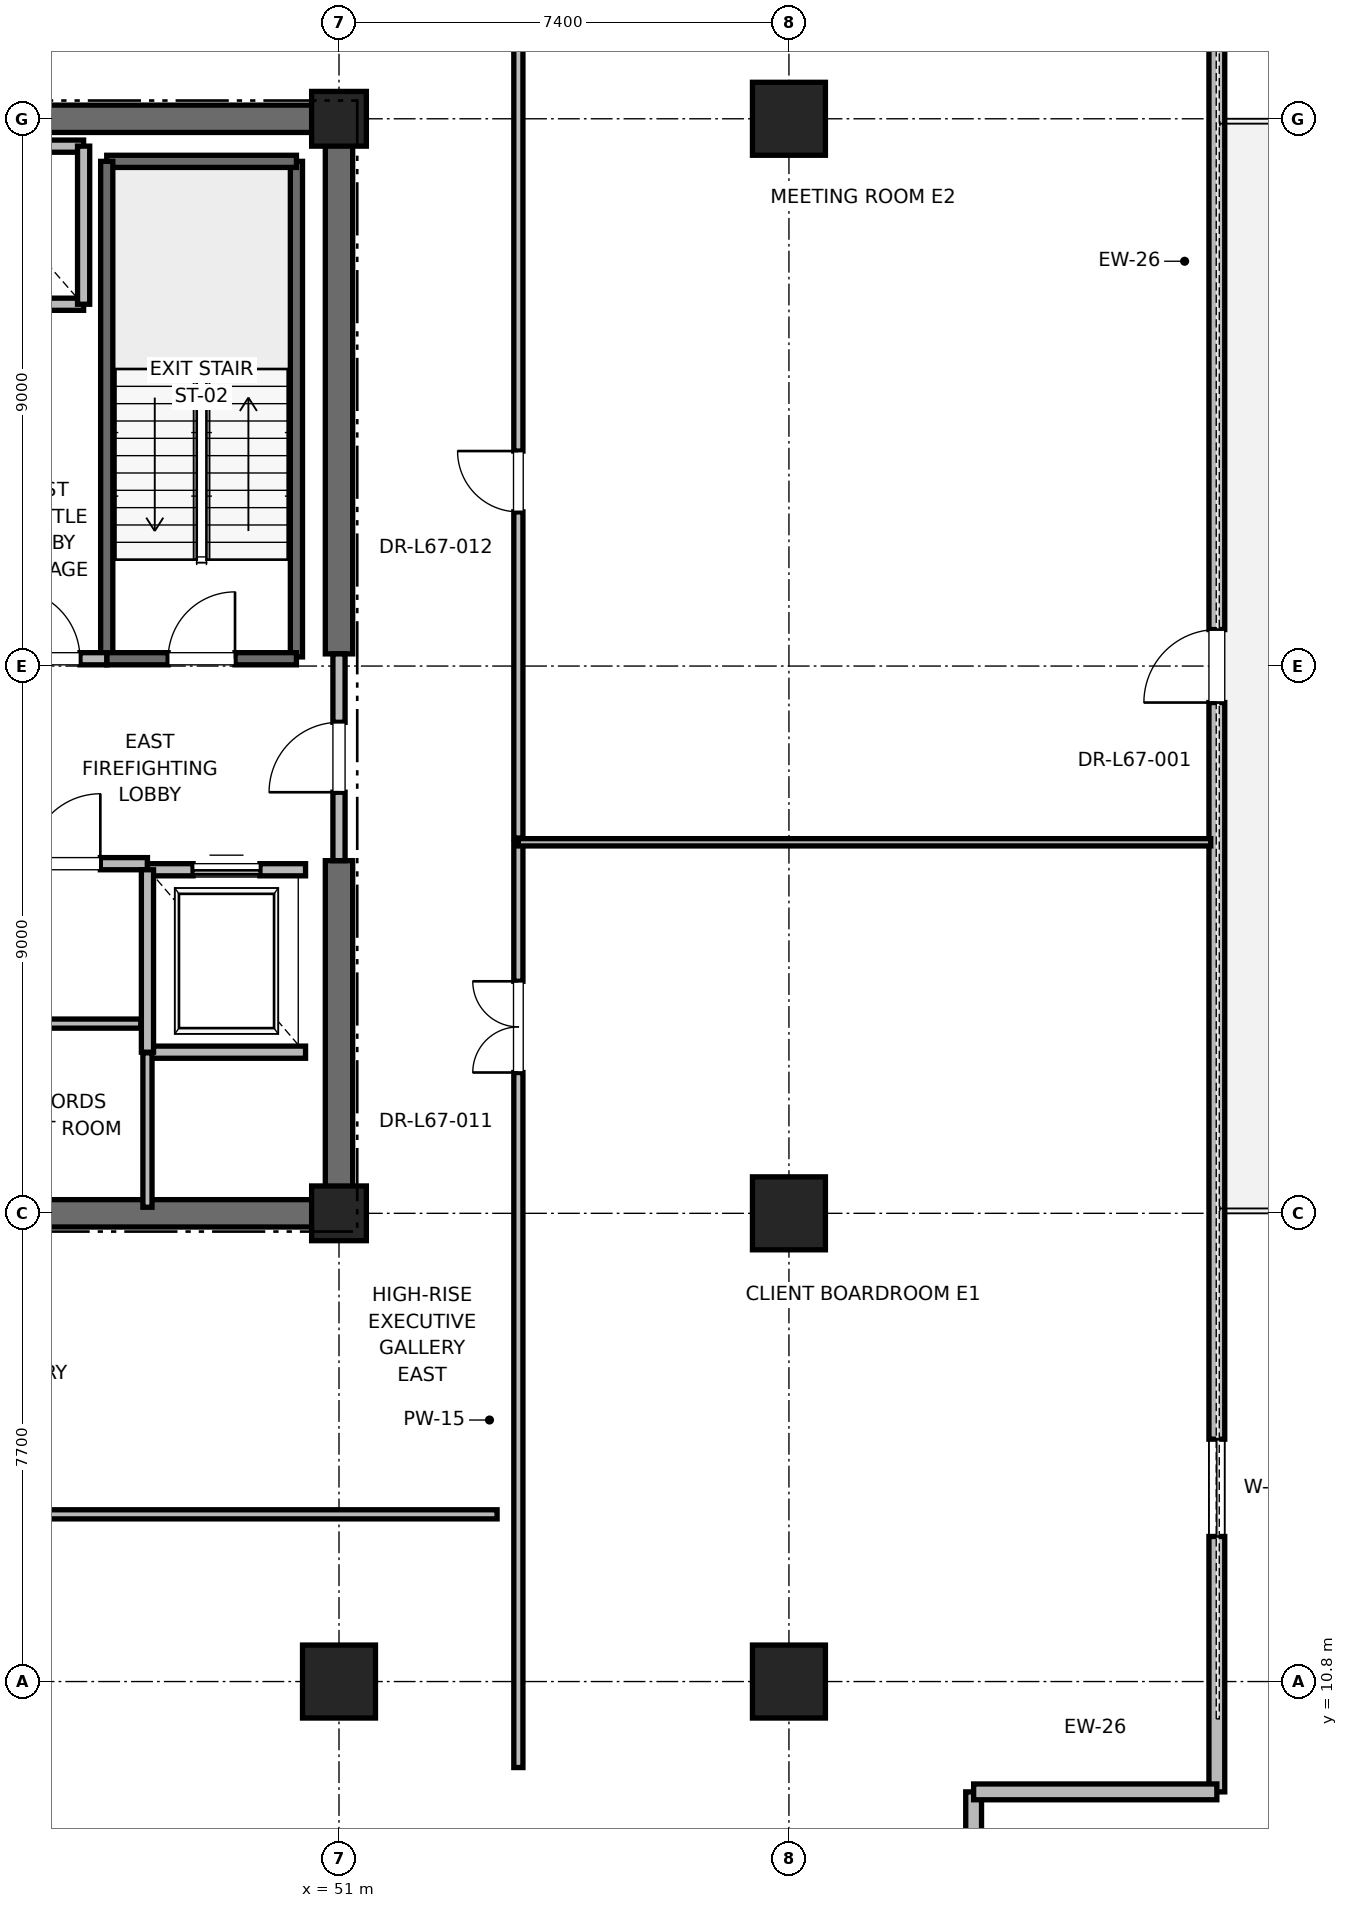
"""IFC4 building model, lengths in metres.
Left out: names, types, materials, properties, quantities, classifications, styles, units other than length and angle.
Written with IfcOpenShell. Run it as: python <this file> out.ifc"""

import sys

from ifc_helpers import new_model, si_unit, direction, frame, frame_2d, origin, origin_2d, place, context, subcontext, project, spatial, rectangle, extrude, element, fill, save


model = new_model("IFC4")
c1 = context("Model", 3, precision=1e-05, world=origin(), true_north=direction((0.0, 1.0)))
c2 = subcontext(c1, "Body", "Model", "MODEL_VIEW")
j1 = project(units=[si_unit("LENGTHUNIT", "METRE"), si_unit("PLANEANGLEUNIT", "RADIAN")], contexts=[c1])
p1 = place(None, origin())
s1 = spatial("IfcSite", under=j1, at=p1, CompositionType="ELEMENT")
p2 = place(p1, origin())
s2 = spatial("IfcBuilding", under=s1, at=p2, CompositionType="ELEMENT")
p3 = place(p2, frame((0.0, 0.0, 287.2)))
s3 = spatial("IfcBuildingStorey", under=s2, at=p3, CompositionType="ELEMENT", Elevation=287.2)
for number, where, z_axis, x_axis in (
    (1, (51.0, 10.8, 0.0), (0.0, 0.0, 1.0), (1.0, 0.0, 0.0)),
    (2, (58.4, 18.5, 0.0), (0.0, 0.0, 1.0), (1.0, 0.0, 0.0)),
    (3, (58.4, 36.5, 0.0), (0.0, 0.0, 1.0), (1.0, 0.0, 0.0)),
    (4, (58.4, 10.8, 0.0), (0.0, 0.0, 1.0), (1.0, 0.0, 0.0)),
):
    element("IfcColumn", number, at=place(p3, frame(where, z_axis=z_axis, x_axis=x_axis)), inside=s3, PredefinedType="COLUMN", context=c2, shape_type="SweptSolid", body=[
        extrude(rectangle(XDim=1.2, YDim=1.2, at=origin_2d()), origin(), (0.0, 0.0, 1.0), 4.0),
    ])
for number, where, z_axis, x_axis in (
    (5, (51.0, 18.5, 0.0), (0.0, 0.0, 1.0), (1.0, 0.0, 0.0)),
    (6, (51.0, 36.5, 0.0), (0.0, 0.0, 1.0), (1.0, 0.0, 0.0)),
):
    element("IfcColumn", number, at=place(p3, frame(where, z_axis=z_axis, x_axis=x_axis)), inside=s3, PredefinedType="PILASTER", context=c2, shape_type="SweptSolid", body=[
        extrude(rectangle(XDim=0.9, YDim=0.9, at=origin_2d()), origin(), (0.0, 0.0, 1.0), 4.0),
    ])
p4 = place(p3, frame((41.8, 18.5, 0.0), z_axis=(0.0, 0.0, 1.0), x_axis=(1.0, 0.0, 0.0)))
e7 = element("IfcWall", 7, at=p4, inside=s3, PredefinedType="SHEAR", context=c2, shape_type="SweptSolid", body=[
    extrude(rectangle(XDim=9.2, YDim=0.45, at=frame_2d((4.6, 0.0))), origin(), (0.0, 0.0, 1.0), 3.785),
])
for number, where, z_axis, x_axis in (
    (8, (45.2, 36.5, 0.0), (0.0, 0.0, 1.0), (1.0, 0.0, 0.0)),
    (9, (51.0, 18.5, 0.0), (0.0, 0.0, 1.0), (0.0, 1.0, 0.0)),
):
    element("IfcWall", number, at=place(p3, frame(where, z_axis=z_axis, x_axis=x_axis)), inside=s3, PredefinedType="SHEAR", context=c2, shape_type="SweptSolid", body=[
        extrude(rectangle(XDim=5.8, YDim=0.45, at=frame_2d((2.9, 0.0))), origin(), (0.0, 0.0, 1.0), 3.785),
    ])
p5 = place(p3, frame((51.0, 27.7, 0.0), z_axis=(0.0, 0.0, 1.0), x_axis=(0.0, 1.0, 0.0)))
e10 = element("IfcWall", 10, at=p5, inside=s3, PredefinedType="SHEAR", context=c2, shape_type="SweptSolid", body=[
    extrude(rectangle(XDim=8.8, YDim=0.45, at=frame_2d((4.4, 0.0))), origin(), (0.0, 0.0, 1.0), 3.785),
])
p6 = place(p3, frame((65.438, 8.986, 0.0), z_axis=(0.0, 0.0, 1.0), x_axis=(0.0, 1.0, 0.0)))
e11 = element("IfcWall", 11, at=p6, inside=s3, PredefinedType="PARAPET", context=c2, shape_type="SweptSolid", body=[
    extrude(rectangle(XDim=37.029, YDim=0.26, at=frame_2d((18.514, 0.0))), origin(), (0.0, 0.0, 1.0), 3.123),
])
p7 = place(p6, frame((4.2, 0.0, 0.85)))
e12 = element("IfcOpeningElement", 12, at=p7, cuts=e11, PredefinedType="OPENING", context=c2, shape_type="SweptSolid", body=[
    extrude(rectangle(XDim=1.6, YDim=2.1, at=frame_2d((0.8, 1.05))), frame((0.0, 0.13, 0.0), z_axis=(0.0, -1.0, 0.0), x_axis=(1.0, 0.0, 0.0)), (0.0, 0.0, 1.0), 0.26),
])
p8 = place(p6, frame((17.914, 0.0, 0.0)))
e13 = element("IfcOpeningElement", 13, at=p8, cuts=e11, PredefinedType="OPENING", context=c2, shape_type="SweptSolid", body=[
    extrude(rectangle(XDim=1.2, YDim=2.2, at=frame_2d((0.6, 1.1))), frame((0.0, 0.13, 0.0), z_axis=(0.0, -1.0, 0.0), x_axis=(1.0, 0.0, 0.0)), (0.0, 0.0, 1.0), 0.26),
])
p9 = place(p6, frame((31.229, 0.0, 0.85)))
e14 = element("IfcOpeningElement", 14, at=p9, cuts=e11, PredefinedType="OPENING", context=c2, shape_type="SweptSolid", body=[
    extrude(rectangle(XDim=1.6, YDim=2.1, at=frame_2d((0.8, 1.05))), frame((0.0, 0.13, 0.0), z_axis=(0.0, -1.0, 0.0), x_axis=(1.0, 0.0, 0.0)), (0.0, 0.0, 1.0), 0.26),
])
p10 = place(p3, frame((61.438, 5.486, 0.0), z_axis=(0.0, 0.0, 1.0), x_axis=(0.0, 1.0, 0.0)))
e15 = element("IfcWall", 15, at=p10, inside=s3, PredefinedType="PARAPET", context=c2, shape_type="SweptSolid", body=[
    extrude(rectangle(XDim=3.5, YDim=0.26, at=frame_2d((1.75, 0.0))), origin(), (0.0, 0.0, 1.0), 3.785),
])
p11 = place(p10, frame((1.05, 0.0, 0.85)))
e16 = element("IfcOpeningElement", 16, at=p11, cuts=e15, PredefinedType="OPENING", context=c2, shape_type="SweptSolid", body=[
    extrude(rectangle(XDim=1.4, YDim=2.0, at=frame_2d((0.7, 1.0))), frame((0.0, 0.13, 0.0), z_axis=(0.0, -1.0, 0.0), x_axis=(1.0, 0.0, 0.0)), (0.0, 0.0, 1.0), 0.26),
])
p12 = place(p3, frame((61.438, 8.986, 0.0), z_axis=(0.0, 0.0, 1.0), x_axis=(1.0, 0.0, 0.0)))
e17 = element("IfcWall", 17, at=p12, inside=s3, PredefinedType="PARAPET", context=c2, shape_type="SweptSolid", body=[
    extrude(rectangle(XDim=4.0, YDim=0.26, at=frame_2d((2.0, 0.0))), origin(), (0.0, 0.0, 1.0), 3.785),
])
p13 = place(p3, frame((50.3, 27.65, 0.0), z_axis=(0.0, 0.0, 1.0), x_axis=(0.0, 1.0, 0.0)))
e18 = element("IfcWall", 18, at=p13, inside=s3, PredefinedType="SOLIDWALL", context=c2, shape_type="SweptSolid", body=[
    extrude(rectangle(XDim=8.15, YDim=0.2, at=frame_2d((4.075, 0.0))), origin(), (0.0, 0.0, 1.0), 3.785),
])
p14 = place(p3, frame((47.18, 35.8, 0.0), z_axis=(0.0, 0.0, 1.0), x_axis=(1.0, 0.0, 0.0)))
e19 = element("IfcWall", 19, at=p14, inside=s3, PredefinedType="SOLIDWALL", context=c2, shape_type="SweptSolid", body=[
    extrude(rectangle(XDim=3.12, YDim=0.2, at=frame_2d((1.56, 0.0))), origin(), (0.0, 0.0, 1.0), 3.785),
])
p15 = place(p3, frame((47.18, 27.62, 0.0), z_axis=(0.0, 0.0, 1.0), x_axis=(0.0, 1.0, 0.0)))
e20 = element("IfcWall", 20, at=p15, inside=s3, PredefinedType="SOLIDWALL", context=c2, shape_type="SweptSolid", body=[
    extrude(rectangle(XDim=8.18, YDim=0.2, at=frame_2d((4.09, 0.0))), origin(), (0.0, 0.0, 1.0), 3.785),
])
p16 = place(p3, frame((47.18, 27.62, 0.0), z_axis=(0.0, 0.0, 1.0), x_axis=(1.0, 0.0, 0.0)))
e21 = element("IfcWall", 21, at=p16, inside=s3, PredefinedType="SOLIDWALL", context=c2, shape_type="SweptSolid", body=[
    extrude(rectangle(XDim=3.12, YDim=0.2, at=frame_2d((1.56, 0.0))), origin(), (0.0, 0.0, 1.0), 3.785),
])
p17 = place(p16, frame((1.01, 0.0, 0.0)))
e22 = element("IfcOpeningElement", 22, at=p17, cuts=e21, PredefinedType="OPENING", context=c2, shape_type="SweptSolid", body=[
    extrude(rectangle(XDim=1.1, YDim=2.15, at=frame_2d((0.55, 1.075))), frame((0.0, 0.1, 0.0), z_axis=(0.0, -1.0, 0.0), x_axis=(1.0, 0.0, 0.0)), (0.0, 0.0, 1.0), 0.2),
])
p18 = place(p3, frame((45.15, 24.25, 0.0), z_axis=(0.0, 0.0, 1.0), x_axis=(1.0, 0.0, 0.0)))
e23 = element("IfcWall", 23, at=p18, inside=s3, PredefinedType="PARTITIONING", context=c2, shape_type="SweptSolid", body=[
    extrude(rectangle(XDim=2.7, YDim=0.2, at=frame_2d((1.35, 0.0))), origin(), (0.0, 0.0, 1.0), 3.785),
])
p19 = place(p18, frame((0.775, 0.0, 0.0)))
e24 = element("IfcOpeningElement", 24, at=p19, cuts=e23, PredefinedType="OPENING", context=c2, shape_type="SweptSolid", body=[
    extrude(rectangle(XDim=1.15, YDim=2.2, at=frame_2d((0.575, 1.1))), frame((0.0, 0.1, 0.0), z_axis=(0.0, -1.0, 0.0), x_axis=(1.0, 0.0, 0.0)), (0.0, 0.0, 1.0), 0.2),
])
p20 = place(p3, frame((45.15, 27.62, 0.0), z_axis=(0.0, 0.0, 1.0), x_axis=(1.0, 0.0, 0.0)))
e25 = element("IfcWall", 25, at=p20, inside=s3, PredefinedType="PARTITIONING", context=c2, shape_type="SweptSolid", body=[
    extrude(rectangle(XDim=2.03, YDim=0.2, at=frame_2d((1.015, 0.0))), origin(), (0.0, 0.0, 1.0), 3.785),
])
p21 = place(p20, frame((0.44, 0.0, 0.0)))
e26 = element("IfcOpeningElement", 26, at=p21, cuts=e25, PredefinedType="OPENING", context=c2, shape_type="SweptSolid", body=[
    extrude(rectangle(XDim=1.15, YDim=2.2, at=frame_2d((0.575, 1.1))), frame((0.0, 0.1, 0.0), z_axis=(0.0, -1.0, 0.0), x_axis=(1.0, 0.0, 0.0)), (0.0, 0.0, 1.0), 0.2),
])
p22 = place(p3, frame((51.0, 24.3, 0.0), z_axis=(0.0, 0.0, 1.0), x_axis=(0.0, 1.0, 0.0)))
e27 = element("IfcWall", 27, at=p22, inside=s3, PredefinedType="PARTITIONING", context=c2, shape_type="SweptSolid", body=[
    extrude(rectangle(XDim=3.4, YDim=0.2, at=frame_2d((1.7, 0.0))), origin(), (0.0, 0.0, 1.0), 2.865),
])
p23 = place(p22, frame((1.125, 0.0, 0.0)))
e28 = element("IfcOpeningElement", 28, at=p23, cuts=e27, PredefinedType="OPENING", context=c2, shape_type="SweptSolid", body=[
    extrude(rectangle(XDim=1.15, YDim=2.2, at=frame_2d((0.575, 1.1))), frame((0.0, 0.1, 0.0), z_axis=(0.0, -1.0, 0.0), x_axis=(1.0, 0.0, 0.0)), (0.0, 0.0, 1.0), 0.2),
])
p24 = place(p3, frame((47.85, 21.15, 0.0), z_axis=(0.0, 0.0, 1.0), x_axis=(1.0, 0.0, 0.0)))
e29 = element("IfcWall", 29, at=p24, inside=s3, PredefinedType="SOLIDWALL", context=c2, shape_type="SweptSolid", body=[
    extrude(rectangle(XDim=2.6, YDim=0.2, at=frame_2d((1.3, 0.0))), origin(), (0.0, 0.0, 1.0), 3.785),
])
p25 = place(p3, frame((50.45, 24.15, 0.0), z_axis=(0.0, 0.0, 1.0), x_axis=(-1.0, 0.0, 0.0)))
e30 = element("IfcWall", 30, at=p25, inside=s3, PredefinedType="SOLIDWALL", context=c2, shape_type="SweptSolid", body=[
    extrude(rectangle(XDim=2.6, YDim=0.2, at=frame_2d((1.3, 0.0))), origin(), (0.0, 0.0, 1.0), 2.865),
])
p26 = place(p25, frame((0.75, 0.0, 0.0)))
e31 = element("IfcOpeningElement", 31, at=p26, cuts=e30, PredefinedType="OPENING", context=c2, shape_type="SweptSolid", body=[
    extrude(rectangle(XDim=1.1, YDim=2.2, at=frame_2d((0.55, 1.1))), frame((0.0, 0.1, 0.0), z_axis=(0.0, -1.0, 0.0), x_axis=(1.0, 0.0, 0.0)), (0.0, 0.0, 1.0), 0.2),
])
p27 = place(p3, frame((47.85, 24.15, 0.0), z_axis=(0.0, 0.0, 1.0), x_axis=(0.0, -1.0, 0.0)))
e32 = element("IfcWall", 32, at=p27, inside=s3, PredefinedType="SOLIDWALL", context=c2, shape_type="SweptSolid", body=[
    extrude(rectangle(XDim=3.0, YDim=0.2, at=frame_2d((1.5, 0.0))), origin(), (0.0, 0.0, 1.0), 3.785),
])
p28 = place(p3, frame((44.5, 33.45, 0.0), z_axis=(0.0, 0.0, 1.0), x_axis=(1.0, 0.0, 0.0)))
e33 = element("IfcWall", 33, at=p28, inside=s3, PredefinedType="SOLIDWALL", context=c2, shape_type="SweptSolid", body=[
    extrude(rectangle(XDim=2.3, YDim=0.2, at=frame_2d((1.15, 0.0))), origin(), (0.0, 0.0, 1.0), 3.785),
])
p29 = place(p3, frame((46.8, 36.05, 0.0), z_axis=(0.0, 0.0, 1.0), x_axis=(-1.0, 0.0, 0.0)))
e34 = element("IfcWall", 34, at=p29, inside=s3, PredefinedType="SOLIDWALL", context=c2, shape_type="SweptSolid", body=[
    extrude(rectangle(XDim=2.3, YDim=0.2, at=frame_2d((1.15, 0.0))), origin(), (0.0, 0.0, 1.0), 2.865),
])
p30 = place(p3, frame((46.8, 33.45, 0.0), z_axis=(0.0, 0.0, 1.0), x_axis=(0.0, 1.0, 0.0)))
e35 = element("IfcWall", 35, at=p30, inside=s3, PredefinedType="SOLIDWALL", context=c2, shape_type="SweptSolid", body=[
    extrude(rectangle(XDim=2.6, YDim=0.2, at=frame_2d((1.3, 0.0))), origin(), (0.0, 0.0, 1.0), 3.785),
])
p31 = place(p3, frame((47.85, 18.6, 0.0), z_axis=(0.0, 0.0, 1.0), x_axis=(0.0, 1.0, 0.0)))
e36 = element("IfcWall", 36, at=p31, inside=s3, PredefinedType="PARTITIONING", context=c2, shape_type="SweptSolid", body=[
    extrude(rectangle(XDim=2.54, YDim=0.15, at=frame_2d((1.27, 0.0))), origin(), (0.0, 0.0, 1.0), 2.85),
])
p32 = place(p3, frame((41.76, 21.62, 0.0), z_axis=(0.0, 0.0, 1.0), x_axis=(1.0, 0.0, 0.0)))
e37 = element("IfcWall", 37, at=p32, inside=s3, PredefinedType="PARTITIONING", context=c2, shape_type="SweptSolid", body=[
    extrude(rectangle(XDim=5.98, YDim=0.15, at=frame_2d((2.99, 0.0))), origin(), (0.0, 0.0, 1.0), 2.85),
])
p33 = place(p32, frame((2.49, 0.0, 0.0)))
e38 = element("IfcOpeningElement", 38, at=p33, cuts=e37, PredefinedType="OPENING", context=c2, shape_type="SweptSolid", body=[
    extrude(rectangle(XDim=1.0, YDim=2.15, at=frame_2d((0.5, 1.075))), frame((0.0, 0.075, 0.0), z_axis=(0.0, -1.0, 0.0), x_axis=(1.0, 0.0, 0.0)), (0.0, 0.0, 1.0), 0.15),
])
p34 = place(p3, frame((26.4, 13.55, 0.0), z_axis=(0.0, 0.0, 1.0), x_axis=(1.0, 0.0, 0.0)))
e39 = element("IfcWall", 39, at=p34, inside=s3, PredefinedType="PARTITIONING", context=c2, shape_type="SweptSolid", body=[
    extrude(rectangle(XDim=27.2, YDim=0.15, at=frame_2d((13.6, 0.0))), origin(), (0.0, 0.0, 1.0), 2.85),
])
p35 = place(p34, frame((13.1, 0.0, 0.0)))
e40 = element("IfcOpeningElement", 40, at=p35, cuts=e39, PredefinedType="OPENING", context=c2, shape_type="SweptSolid", body=[
    extrude(rectangle(XDim=1.0, YDim=2.15, at=frame_2d((0.5, 1.075))), frame((0.0, 0.075, 0.0), z_axis=(0.0, -1.0, 0.0), x_axis=(1.0, 0.0, 0.0)), (0.0, 0.0, 1.0), 0.15),
])
p36 = place(p3, frame((53.95, 9.386, 0.0), z_axis=(0.0, 0.0, 1.0), x_axis=(0.0, 1.0, 0.0)))
e41 = element("IfcWall", 41, at=p36, inside=s3, PredefinedType="PARTITIONING", context=c2, shape_type="SweptSolid", body=[
    extrude(rectangle(XDim=15.216, YDim=0.15, at=frame_2d((7.608, 0.0))), origin(), (0.0, 0.0, 1.0), 2.85),
])
p37 = place(p36, frame((11.43, 0.0, 0.0)))
e42 = element("IfcOpeningElement", 42, at=p37, cuts=e41, PredefinedType="OPENING", context=c2, shape_type="SweptSolid", body=[
    extrude(rectangle(XDim=1.5, YDim=2.25, at=frame_2d((0.75, 1.125))), frame((0.0, 0.075, 0.0), z_axis=(0.0, -1.0, 0.0), x_axis=(1.0, 0.0, 0.0)), (0.0, 0.0, 1.0), 0.15),
])
p38 = place(p3, frame((53.95, 24.602, 0.0), z_axis=(0.0, 0.0, 1.0), x_axis=(1.0, 0.0, 0.0)))
e43 = element("IfcWall", 43, at=p38, inside=s3, PredefinedType="PARTITIONING", context=c2, shape_type="SweptSolid", body=[
    extrude(rectangle(XDim=11.387, YDim=0.12, at=frame_2d((5.694, 0.0))), origin(), (0.0, 0.0, 1.0), 2.85),
])
p39 = place(p3, frame((53.95, 24.672, 0.0), z_axis=(0.0, 0.0, 1.0), x_axis=(0.0, 1.0, 0.0)))
e44 = element("IfcWall", 44, at=p39, inside=s3, PredefinedType="PARTITIONING", context=c2, shape_type="SweptSolid", body=[
    extrude(rectangle(XDim=20.943, YDim=0.15, at=frame_2d((10.471, 0.0))), origin(), (0.0, 0.0, 1.0), 2.85),
])
p40 = place(p39, frame((5.364, 0.0, 0.0)))
e45 = element("IfcOpeningElement", 45, at=p40, cuts=e44, PredefinedType="OPENING", context=c2, shape_type="SweptSolid", body=[
    extrude(rectangle(XDim=1.0, YDim=2.15, at=frame_2d((0.5, 1.075))), frame((0.0, 0.075, 0.0), z_axis=(0.0, -1.0, 0.0), x_axis=(1.0, 0.0, 0.0)), (0.0, 0.0, 1.0), 0.15),
])
p41 = place(p7, origin())
e46 = element("IfcWindow", 46, at=p41, inside=s3, PartitioningType="SINGLE_PANEL", PredefinedType="WINDOW", context=c2, shape_type="SweptSolid", body=[
    extrude(rectangle(XDim=1.6, YDim=2.1, at=frame_2d((0.8, 1.05))), frame((0.0, 0.03, 0.0), z_axis=(0.0, -1.0, 0.0), x_axis=(1.0, 0.0, 0.0)), (0.0, 0.0, 1.0), 0.06),
])
fill(e12, e46)
p42 = place(p8, origin())
e47 = element("IfcDoor", 47, at=p42, inside=s3, OperationType="SINGLE_SWING_LEFT", PredefinedType="DOOR", context=c2, shape_type="SweptSolid", body=[
    extrude(rectangle(XDim=1.2, YDim=2.2, at=frame_2d((0.6, 1.1))), frame((0.0, 0.025, 0.0), z_axis=(0.0, -1.0, 0.0), x_axis=(1.0, 0.0, 0.0)), (0.0, 0.0, 1.0), 0.05),
])
fill(e13, e47)
p43 = place(p17, origin())
e48 = element("IfcDoor", 48, at=p43, inside=s3, OperationType="SINGLE_SWING_RIGHT", PredefinedType="DOOR", context=c2, shape_type="SweptSolid", body=[
    extrude(rectangle(XDim=1.1, YDim=2.15, at=frame_2d((0.55, 1.075))), frame((0.0, 0.025, 0.0), z_axis=(0.0, -1.0, 0.0), x_axis=(1.0, 0.0, 0.0)), (0.0, 0.0, 1.0), 0.05),
])
fill(e22, e48)
p44 = place(p19, origin())
e49 = element("IfcDoor", 49, at=p44, inside=s3, OperationType="SINGLE_SWING_RIGHT", PredefinedType="DOOR", context=c2, shape_type="SweptSolid", body=[
    extrude(rectangle(XDim=1.15, YDim=2.2, at=frame_2d((0.575, 1.1))), frame((0.0, 0.025, 0.0), z_axis=(0.0, -1.0, 0.0), x_axis=(1.0, 0.0, 0.0)), (0.0, 0.0, 1.0), 0.05),
])
fill(e24, e49)
p45 = place(p21, origin())
e50 = element("IfcDoor", 50, at=p45, inside=s3, OperationType="SINGLE_SWING_LEFT", PredefinedType="DOOR", context=c2, shape_type="SweptSolid", body=[
    extrude(rectangle(XDim=1.15, YDim=2.2, at=frame_2d((0.575, 1.1))), frame((0.0, 0.025, 0.0), z_axis=(0.0, -1.0, 0.0), x_axis=(1.0, 0.0, 0.0)), (0.0, 0.0, 1.0), 0.05),
])
fill(e26, e50)
p46 = place(p23, origin())
e51 = element("IfcDoor", 51, at=p46, inside=s3, OperationType="SINGLE_SWING_LEFT", PredefinedType="DOOR", context=c2, shape_type="SweptSolid", body=[
    extrude(rectangle(XDim=1.15, YDim=2.2, at=frame_2d((0.575, 1.1))), frame((0.0, 0.025, 0.0), z_axis=(0.0, -1.0, 0.0), x_axis=(1.0, 0.0, 0.0)), (0.0, 0.0, 1.0), 0.05),
])
fill(e28, e51)
p47 = place(p26, origin())
e52 = element("IfcDoor", 52, at=p47, inside=s3, OperationType="SLIDING_TO_RIGHT", PredefinedType="DOOR", context=c2, shape_type="SweptSolid", body=[
    extrude(rectangle(XDim=1.1, YDim=2.2, at=frame_2d((0.55, 1.1))), frame((0.0, 0.025, 0.0), z_axis=(0.0, -1.0, 0.0), x_axis=(1.0, 0.0, 0.0)), (0.0, 0.0, 1.0), 0.05),
])
fill(e31, e52)
p48 = place(p37, origin())
e53 = element("IfcDoor", 53, at=p48, inside=s3, OperationType="DOUBLE_DOOR_SINGLE_SWING", PredefinedType="DOOR", context=c2, shape_type="SweptSolid", body=[
    extrude(rectangle(XDim=1.5, YDim=2.25, at=frame_2d((0.75, 1.125))), frame((0.0, 0.025, 0.0), z_axis=(0.0, -1.0, 0.0), x_axis=(1.0, 0.0, 0.0)), (0.0, 0.0, 1.0), 0.05),
])
fill(e42, e53)
p49 = place(p40, origin())
e54 = element("IfcDoor", 54, at=p49, inside=s3, OperationType="SINGLE_SWING_RIGHT", PredefinedType="DOOR", context=c2, shape_type="SweptSolid", body=[
    extrude(rectangle(XDim=1.0, YDim=2.15, at=frame_2d((0.5, 1.075))), frame((0.0, 0.025, 0.0), z_axis=(0.0, -1.0, 0.0), x_axis=(1.0, 0.0, 0.0)), (0.0, 0.0, 1.0), 0.05),
])
fill(e45, e54)
save(model, sys.argv[1])
